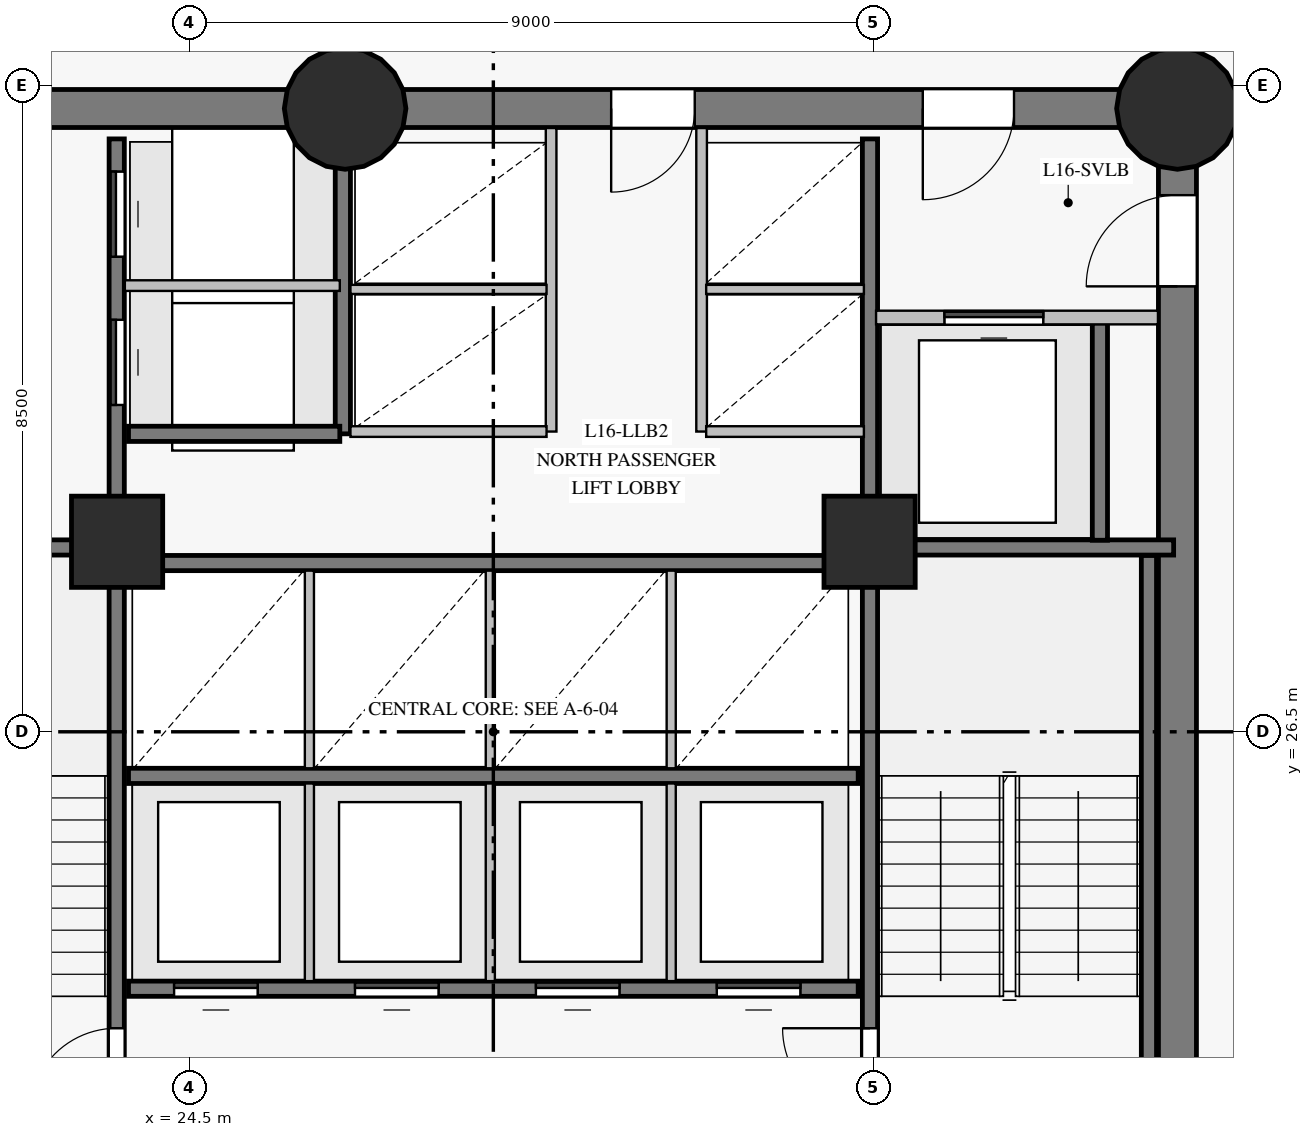
"""IFC4 building model, lengths in metres.
Left out: names, types, materials, properties, quantities, classifications, styles, units other than length and angle.
Written with IfcOpenShell. Run it as: python <this file> out.ifc"""

import sys

from ifc_helpers import new_model, si_unit, direction, frame, frame_2d, origin, origin_with_axes, origin_2d, place, context, subcontext, project, spatial, rectangle, circle, extrude, source, transform, mapped, element, fill, save


model = new_model("IFC4")
c1 = context("Model", 3, precision=1e-05, world=origin(), true_north=direction((0.0, 1.0)))
c2 = subcontext(c1, "Body", "Model", "MODEL_VIEW")
j1 = project(units=[si_unit("LENGTHUNIT", "METRE"), si_unit("PLANEANGLEUNIT", "RADIAN")], contexts=[c1])
p1 = place(None, origin())
s1 = spatial("IfcSite", under=j1, at=p1, CompositionType="ELEMENT")
p2 = place(p1, origin())
s2 = spatial("IfcBuilding", under=s1, at=p2, CompositionType="ELEMENT")
p3 = place(p2, frame((0.0, 0.0, 62.5)))
s3 = spatial("IfcBuildingStorey", under=s2, at=p3, CompositionType="ELEMENT", Elevation=62.5)
p4 = place(p3, frame((37.5, 18.3, 0.0), z_axis=(0.0, 0.0, 1.0), x_axis=(0.0, 1.0, 0.0)))
e1 = element("IfcWall", 1, at=p4, inside=s3, PredefinedType="SHEAR", context=c2, shape_type="SweptSolid", body=[
    extrude(rectangle(XDim=16.4, YDim=0.5, at=frame_2d((8.2, 0.0))), origin(), (0.0, 0.0, 1.0), 3.35),
])
p5 = place(p4, frame((14.06, 0.0, 0.0)))
e2 = element("IfcOpeningElement", 2, at=p5, cuts=e1, PredefinedType="OPENING", context=c2, shape_type="SweptSolid", body=[
    extrude(rectangle(XDim=1.2, YDim=2.15, at=frame_2d((0.6, 1.075))), frame((0.0, 0.26, 0.0), z_axis=(0.0, -1.0, 0.0), x_axis=(1.0, 0.0, 0.0)), (0.0, 0.0, 1.0), 0.52),
])
p6 = place(p3, frame((37.5, 34.7, 0.0), z_axis=(0.0, 0.0, 1.0), x_axis=(-1.0, 0.0, 0.0)))
e3 = element("IfcWall", 3, at=p6, inside=s3, PredefinedType="SHEAR", context=c2, shape_type="SweptSolid", body=[
    extrude(rectangle(XDim=10.95, YDim=0.5, at=frame_2d((5.475, 0.0))), origin(), (0.0, 0.0, 1.0), 3.35),
])
p7 = place(p6, frame((2.15, 0.0, 0.0)))
e4 = element("IfcOpeningElement", 4, at=p7, cuts=e3, PredefinedType="OPENING", context=c2, shape_type="SweptSolid", body=[
    extrude(rectangle(XDim=1.2, YDim=2.15, at=frame_2d((0.6, 1.075))), frame((0.0, 0.26, 0.0), z_axis=(0.0, -1.0, 0.0), x_axis=(1.0, 0.0, 0.0)), (0.0, 0.0, 1.0), 0.52),
])
p8 = place(p6, frame((6.35, 0.0, 0.0)))
e5 = element("IfcOpeningElement", 5, at=p8, cuts=e3, PredefinedType="OPENING", context=c2, shape_type="SweptSolid", body=[
    extrude(rectangle(XDim=1.1, YDim=2.15, at=frame_2d((0.55, 1.075))), frame((0.0, 0.26, 0.0), z_axis=(0.0, -1.0, 0.0), x_axis=(1.0, 0.0, 0.0)), (0.0, 0.0, 1.0), 0.52),
])
p9 = place(p3, frame((26.55, 34.7, 0.0), z_axis=(0.0, 0.0, 1.0), x_axis=(-1.0, 0.0, 0.0)))
e6 = element("IfcWall", 6, at=p9, inside=s3, PredefinedType="SHEAR", context=c2, shape_type="SweptSolid", body=[
    extrude(rectangle(XDim=7.05, YDim=0.5, at=frame_2d((3.525, 0.0))), origin(), (0.0, 0.0, 1.0), 3.35),
])
p10 = place(p9, frame((4.25, 0.0, 0.0)))
e7 = element("IfcOpeningElement", 7, at=p10, cuts=e6, PredefinedType="OPENING", context=c2, shape_type="SweptSolid", body=[
    extrude(rectangle(XDim=1.1, YDim=2.15, at=frame_2d((0.55, 1.075))), frame((0.0, 0.26, 0.0), z_axis=(0.0, -1.0, 0.0), x_axis=(1.0, 0.0, 0.0)), (0.0, 0.0, 1.0), 0.52),
])
m1 = source(origin_with_axes(), c2, "Body", "SweptSolid", [
    extrude(circle(Radius=0.8, at=origin_2d()), origin(), (0.0, 0.0, 1.0), 3.6),
])
for number, where, z_axis, x_axis in (
    (8, (26.55, 34.7, 0.0), (0.0, 0.0, 1.0), (1.0, 0.0, 0.0)),
    (9, (37.5, 34.7, 0.0), (0.0, 0.0, 1.0), (1.0, 0.0, 0.0)),
):
    element("IfcColumn", number, at=place(p3, frame(where, z_axis=z_axis, x_axis=x_axis)), inside=s3, PredefinedType="COLUMN", context=c2, shape_type="MappedRepresentation", body=[
        mapped(m1, transform((0.0, 0.0, 0.0), scale=1.0)),
    ])
m2 = source(origin_with_axes(), c2, "Body", "SweptSolid", [
    extrude(rectangle(XDim=1.2, YDim=1.2, at=origin_2d()), origin(), (0.0, 0.0, 1.0), 3.6),
])
for number, where, z_axis, x_axis in (
    (10, (23.55, 29.0, 0.0), (0.0, 0.0, 1.0), (1.0, 0.0, 0.0)),
    (11, (33.45, 29.0, 0.0), (0.0, 0.0, 1.0), (1.0, 0.0, 0.0)),
):
    element("IfcColumn", number, at=place(p3, frame(where, z_axis=z_axis, x_axis=x_axis)), inside=s3, PredefinedType="COLUMN", context=c2, shape_type="MappedRepresentation", body=[
        mapped(m2, transform((0.0, 0.0, 0.0), scale=1.0)),
    ])
p11 = place(p3, frame((23.545, 18.7, 0.0), z_axis=(0.0, 0.0, 1.0), x_axis=(0.0, 1.0, 0.0)))
e12 = element("IfcWall", 12, at=p11, inside=s3, PredefinedType="SHEAR", context=c2, shape_type="SweptSolid", body=[
    extrude(rectangle(XDim=15.6, YDim=0.2, at=frame_2d((7.8, 0.0))), origin(), (0.0, 0.0, 1.0), 3.35),
])
p12 = place(p11, frame((2.75, 0.0, 0.0)))
e13 = element("IfcOpeningElement", 13, at=p12, cuts=e12, PredefinedType="OPENING", context=c2, shape_type="SweptSolid", body=[
    extrude(rectangle(XDim=1.15, YDim=2.15, at=frame_2d((0.575, 1.075))), frame((0.0, 0.11, 0.0), z_axis=(0.0, -1.0, 0.0), x_axis=(1.0, 0.0, 0.0)), (0.0, 0.0, 1.0), 0.22),
])
p13 = place(p11, frame((0.14, 0.0, 0.0)))
e14 = element("IfcOpeningElement", 14, at=p13, cuts=e12, PredefinedType="OPENING", context=c2, shape_type="SweptSolid", body=[
    extrude(rectangle(XDim=0.88, YDim=2.1, at=frame_2d((0.44, 1.05))), frame((0.0, 0.11, 0.0), z_axis=(0.0, -1.0, 0.0), x_axis=(1.0, 0.0, 0.0)), (0.0, 0.0, 1.0), 0.22),
])
p14 = place(p11, frame((1.36, 0.0, 0.0)))
e15 = element("IfcOpeningElement", 15, at=p14, cuts=e12, PredefinedType="OPENING", context=c2, shape_type="SweptSolid", body=[
    extrude(rectangle(XDim=0.88, YDim=2.1, at=frame_2d((0.44, 1.05))), frame((0.0, 0.11, 0.0), z_axis=(0.0, -1.0, 0.0), x_axis=(1.0, 0.0, 0.0)), (0.0, 0.0, 1.0), 0.22),
])
p15 = place(p11, frame((12.1, 0.0, 0.0)))
e16 = element("IfcOpeningElement", 16, at=p15, cuts=e12, PredefinedType="OPENING", context=c2, shape_type="SweptSolid", body=[
    extrude(rectangle(XDim=1.12, YDim=2.15, at=frame_2d((0.56, 1.075))), frame((0.0, 0.11, 0.0), z_axis=(0.0, -1.0, 0.0), x_axis=(1.0, 0.0, 0.0)), (0.0, 0.0, 1.0), 0.22),
])
p16 = place(p11, frame((14.05, 0.0, 0.0)))
e17 = element("IfcOpeningElement", 17, at=p16, cuts=e12, PredefinedType="OPENING", context=c2, shape_type="SweptSolid", body=[
    extrude(rectangle(XDim=1.12, YDim=2.15, at=frame_2d((0.56, 1.075))), frame((0.0, 0.11, 0.0), z_axis=(0.0, -1.0, 0.0), x_axis=(1.0, 0.0, 0.0)), (0.0, 0.0, 1.0), 0.22),
])
p17 = place(p3, frame((33.455, 18.7, 0.0), z_axis=(0.0, 0.0, 1.0), x_axis=(0.0, 1.0, 0.0)))
e18 = element("IfcWall", 18, at=p17, inside=s3, PredefinedType="SHEAR", context=c2, shape_type="SweptSolid", body=[
    extrude(rectangle(XDim=15.6, YDim=0.2, at=frame_2d((7.8, 0.0))), origin(), (0.0, 0.0, 1.0), 3.35),
])
p18 = place(p17, frame((2.75, 0.0, 0.0)))
e19 = element("IfcOpeningElement", 19, at=p18, cuts=e18, PredefinedType="OPENING", context=c2, shape_type="SweptSolid", body=[
    extrude(rectangle(XDim=1.15, YDim=2.15, at=frame_2d((0.575, 1.075))), frame((0.0, 0.11, 0.0), z_axis=(0.0, -1.0, 0.0), x_axis=(1.0, 0.0, 0.0)), (0.0, 0.0, 1.0), 0.22),
])
p19 = place(p17, frame((0.55, 0.0, 0.0)))
e20 = element("IfcOpeningElement", 20, at=p19, cuts=e18, PredefinedType="OPENING", context=c2, shape_type="SweptSolid", body=[
    extrude(rectangle(XDim=0.94, YDim=2.1, at=frame_2d((0.47, 1.05))), frame((0.0, 0.11, 0.0), z_axis=(0.0, -1.0, 0.0), x_axis=(1.0, 0.0, 0.0)), (0.0, 0.0, 1.0), 0.22),
])
p20 = place(p3, frame((23.7, 23.12, 0.0), z_axis=(0.0, 0.0, 1.0), x_axis=(1.0, 0.0, 0.0)))
e21 = element("IfcWall", 21, at=p20, inside=s3, PredefinedType="SHEAR", context=c2, shape_type="SweptSolid", body=[
    extrude(rectangle(XDim=9.6, YDim=0.2, at=frame_2d((4.8, 0.0))), origin(), (0.0, 0.0, 1.0), 3.35),
])
p21 = place(p20, frame((0.6, 0.0, 0.0)))
e22 = element("IfcOpeningElement", 22, at=p21, cuts=e21, PredefinedType="OPENING", context=c2, shape_type="SweptSolid", body=[
    extrude(rectangle(XDim=1.1, YDim=2.15, at=frame_2d((0.55, 1.075))), frame((0.0, 0.11, 0.0), z_axis=(0.0, -1.0, 0.0), x_axis=(1.0, 0.0, 0.0)), (0.0, 0.0, 1.0), 0.22),
])
p22 = place(p20, frame((2.98, 0.0, 0.0)))
e23 = element("IfcOpeningElement", 23, at=p22, cuts=e21, PredefinedType="OPENING", context=c2, shape_type="SweptSolid", body=[
    extrude(rectangle(XDim=1.1, YDim=2.15, at=frame_2d((0.55, 1.075))), frame((0.0, 0.11, 0.0), z_axis=(0.0, -1.0, 0.0), x_axis=(1.0, 0.0, 0.0)), (0.0, 0.0, 1.0), 0.22),
])
p23 = place(p20, frame((5.36, 0.0, 0.0)))
e24 = element("IfcOpeningElement", 24, at=p23, cuts=e21, PredefinedType="OPENING", context=c2, shape_type="SweptSolid", body=[
    extrude(rectangle(XDim=1.1, YDim=2.15, at=frame_2d((0.55, 1.075))), frame((0.0, 0.11, 0.0), z_axis=(0.0, -1.0, 0.0), x_axis=(1.0, 0.0, 0.0)), (0.0, 0.0, 1.0), 0.22),
])
p24 = place(p20, frame((7.74, 0.0, 0.0)))
e25 = element("IfcOpeningElement", 25, at=p24, cuts=e21, PredefinedType="OPENING", context=c2, shape_type="SweptSolid", body=[
    extrude(rectangle(XDim=1.1, YDim=2.15, at=frame_2d((0.55, 1.075))), frame((0.0, 0.11, 0.0), z_axis=(0.0, -1.0, 0.0), x_axis=(1.0, 0.0, 0.0)), (0.0, 0.0, 1.0), 0.22),
])
for number, where, z_axis, x_axis in (
    (26, (23.7, 25.92, 0.0), (0.0, 0.0, 1.0), (1.0, 0.0, 0.0)),
    (27, (23.7, 28.72, 0.0), (0.0, 0.0, 1.0), (1.0, 0.0, 0.0)),
):
    element("IfcWall", number, at=place(p3, frame(where, z_axis=z_axis, x_axis=x_axis)), inside=s3, PredefinedType="SHEAR", context=c2, shape_type="SweptSolid", body=[
        extrude(rectangle(XDim=9.6, YDim=0.2, at=frame_2d((4.8, 0.0))), origin(), (0.0, 0.0, 1.0), 3.35),
    ])
p25 = place(p3, frame((37.125, 21.32, 0.0), z_axis=(0.0, 0.0, 1.0), x_axis=(0.0, 1.0, 0.0)))
e28 = element("IfcWall", 28, at=p25, inside=s3, PredefinedType="SHEAR", context=c2, shape_type="SweptSolid", body=[
    extrude(rectangle(XDim=7.5, YDim=0.2, at=frame_2d((3.75, 0.0))), origin(), (0.0, 0.0, 1.0), 3.35),
])
for number, where, z_axis, x_axis in (
    (29, (33.455, 28.925, 0.0), (0.0, 0.0, 1.0), (1.0, 0.0, 0.0)),
    (30, (19.55, 28.925, 0.0), (0.0, 0.0, 1.0), (1.0, 0.0, 0.0)),
):
    element("IfcWall", number, at=place(p3, frame(where, z_axis=z_axis, x_axis=x_axis)), inside=s3, PredefinedType="SHEAR", context=c2, shape_type="SweptSolid", body=[
        extrude(rectangle(XDim=3.995, YDim=0.2, at=frame_2d((1.998, 0.0))), origin(), (0.0, 0.0, 1.0), 3.35),
    ])
p26 = place(p3, frame((26.52, 30.42, 0.0), z_axis=(0.0, 0.0, 1.0), x_axis=(0.0, 1.0, 0.0)))
e31 = element("IfcWall", 31, at=p26, inside=s3, PredefinedType="SHEAR", context=c2, shape_type="SweptSolid", body=[
    extrude(rectangle(XDim=3.86, YDim=0.2, at=frame_2d((1.93, 0.0))), origin(), (0.0, 0.0, 1.0), 3.35),
])
p27 = place(p3, frame((36.48, 29.02, 0.0), z_axis=(0.0, 0.0, 1.0), x_axis=(0.0, 1.0, 0.0)))
e32 = element("IfcWall", 32, at=p27, inside=s3, PredefinedType="SHEAR", context=c2, shape_type="SweptSolid", body=[
    extrude(rectangle(XDim=2.86, YDim=0.2, at=frame_2d((1.43, 0.0))), origin(), (0.0, 0.0, 1.0), 3.35),
])
p28 = place(p3, frame((23.7, 30.42, 0.0), z_axis=(0.0, 0.0, 1.0), x_axis=(1.0, 0.0, 0.0)))
e33 = element("IfcWall", 33, at=p28, inside=s3, PredefinedType="SHEAR", context=c2, shape_type="SweptSolid", body=[
    extrude(rectangle(XDim=2.78, YDim=0.2, at=frame_2d((1.39, 0.0))), origin(), (0.0, 0.0, 1.0), 3.35),
])
for number, where, z_axis, x_axis in (
    (34, (29.26, 30.45, 0.0), (0.0, 0.0, 1.0), (0.0, 1.0, 0.0)),
    (35, (31.24, 30.45, 0.0), (0.0, 0.0, 1.0), (0.0, 1.0, 0.0)),
):
    element("IfcWall", number, at=place(p3, frame(where, z_axis=z_axis, x_axis=x_axis)), inside=s3, PredefinedType="PARTITIONING", context=c2, shape_type="SweptSolid", body=[
        extrude(rectangle(XDim=3.993, YDim=0.14, at=frame_2d((1.997, 0.0))), origin(), (0.0, 0.0, 1.0), 3.35),
    ])
p29 = place(p3, frame((33.535, 31.95, 0.0), z_axis=(0.0, 0.0, 1.0), x_axis=(1.0, 0.0, 0.0)))
e36 = element("IfcWall", 36, at=p29, inside=s3, PredefinedType="PARTITIONING", context=c2, shape_type="SweptSolid", body=[
    extrude(rectangle(XDim=3.709, YDim=0.18, at=frame_2d((1.854, 0.0))), origin(), (0.0, 0.0, 1.0), 3.35),
])
p30 = place(p29, frame((0.9, 0.0, 0.0)))
e37 = element("IfcOpeningElement", 37, at=p30, cuts=e36, PredefinedType="OPENING", context=c2, shape_type="SweptSolid", body=[
    extrude(rectangle(XDim=1.3, YDim=2.2, at=frame_2d((0.65, 1.1))), frame((0.0, 0.1, 0.0), z_axis=(0.0, -1.0, 0.0), x_axis=(1.0, 0.0, 0.0)), (0.0, 0.0, 1.0), 0.2),
])
p31 = place(p3, frame((23.652, 32.37, 0.0), z_axis=(0.0, 0.0, 1.0), x_axis=(1.0, 0.0, 0.0)))
e38 = element("IfcWall", 38, at=p31, inside=s3, PredefinedType="PARTITIONING", context=c2, shape_type="SweptSolid", body=[
    extrude(rectangle(XDim=2.828, YDim=0.14, at=frame_2d((1.414, 0.0))), origin(), (0.0, 0.0, 1.0), 3.35),
])
for number, where, z_axis, x_axis in (
    (39, (26.08, 23.22, 0.0), (0.0, 0.0, 1.0), (0.0, 1.0, 0.0)),
    (40, (28.46, 23.22, 0.0), (0.0, 0.0, 1.0), (0.0, 1.0, 0.0)),
    (41, (30.84, 23.22, 0.0), (0.0, 0.0, 1.0), (0.0, 1.0, 0.0)),
    (42, (26.08, 26.02, 0.0), (0.0, 0.0, 1.0), (0.0, 1.0, 0.0)),
    (43, (28.46, 26.02, 0.0), (0.0, 0.0, 1.0), (0.0, 1.0, 0.0)),
    (44, (30.84, 26.02, 0.0), (0.0, 0.0, 1.0), (0.0, 1.0, 0.0)),
):
    element("IfcWall", number, at=place(p3, frame(where, z_axis=z_axis, x_axis=x_axis)), inside=s3, PredefinedType="PARTITIONING", context=c2, shape_type="SweptSolid", body=[
        extrude(rectangle(XDim=2.6, YDim=0.12, at=frame_2d((1.3, 0.0))), origin(), (0.0, 0.0, 1.0), 3.35),
    ])
p32 = place(p3, frame((26.62, 30.45, 0.0), z_axis=(0.0, 0.0, 1.0), x_axis=(1.0, 0.0, 0.0)))
e45 = element("IfcWall", 45, at=p32, inside=s3, PredefinedType="PARTITIONING", context=c2, shape_type="SweptSolid", body=[
    extrude(rectangle(XDim=2.58, YDim=0.14, at=frame_2d((1.29, 0.0))), origin(), (0.0, 0.0, 1.0), 3.35),
])
p33 = place(p3, frame((26.62, 32.32, 0.0), z_axis=(0.0, 0.0, 1.0), x_axis=(1.0, 0.0, 0.0)))
e46 = element("IfcWall", 46, at=p33, inside=s3, PredefinedType="PARTITIONING", context=c2, shape_type="SweptSolid", body=[
    extrude(rectangle(XDim=2.58, YDim=0.12, at=frame_2d((1.29, 0.0))), origin(), (0.0, 0.0, 1.0), 3.35),
])
p34 = place(p3, frame((31.3, 30.45, 0.0), z_axis=(0.0, 0.0, 1.0), x_axis=(1.0, 0.0, 0.0)))
e47 = element("IfcWall", 47, at=p34, inside=s3, PredefinedType="PARTITIONING", context=c2, shape_type="SweptSolid", body=[
    extrude(rectangle(XDim=2.075, YDim=0.14, at=frame_2d((1.038, 0.0))), origin(), (0.0, 0.0, 1.0), 3.35),
])
p35 = place(p3, frame((31.3, 32.32, 0.0), z_axis=(0.0, 0.0, 1.0), x_axis=(1.0, 0.0, 0.0)))
e48 = element("IfcWall", 48, at=p35, inside=s3, PredefinedType="PARTITIONING", context=c2, shape_type="SweptSolid", body=[
    extrude(rectangle(XDim=2.075, YDim=0.12, at=frame_2d((1.038, 0.0))), origin(), (0.0, 0.0, 1.0), 3.35),
])
m3 = source(origin_with_axes(), c2, "Body", "SweptSolid", [
    extrude(rectangle(XDim=1.15, YDim=2.15, at=frame_2d((0.575, 1.075))), frame((0.0, 0.025, 0.0), z_axis=(0.0, -1.0, 0.0), x_axis=(1.0, 0.0, 0.0)), (0.0, 0.0, 1.0), 0.05),
])
p36 = place(p12, origin())
e49 = element("IfcDoor", 49, at=p36, inside=s3, OperationType="SINGLE_SWING_LEFT", PredefinedType="DOOR", context=c2, shape_type="MappedRepresentation", body=[
    mapped(m3, transform((0.0, 0.0, 0.0), scale=1.0)),
])
fill(e13, e49)
p37 = place(p18, origin())
e50 = element("IfcDoor", 50, at=p37, inside=s3, OperationType="SINGLE_SWING_RIGHT", PredefinedType="DOOR", context=c2, shape_type="MappedRepresentation", body=[
    mapped(m3, transform((0.0, 0.0, 0.0), scale=1.0)),
])
fill(e19, e50)
m4 = source(origin_with_axes(), c2, "Body", "SweptSolid", [
    extrude(rectangle(XDim=1.2, YDim=2.15, at=frame_2d((0.6, 1.075))), frame((0.0, 0.025, 0.0), z_axis=(0.0, -1.0, 0.0), x_axis=(1.0, 0.0, 0.0)), (0.0, 0.0, 1.0), 0.05),
])
p38 = place(p5, origin())
e51 = element("IfcDoor", 51, at=p38, inside=s3, OperationType="SINGLE_SWING_LEFT", PredefinedType="DOOR", context=c2, shape_type="MappedRepresentation", body=[
    mapped(m4, transform((0.0, 0.0, 0.0), scale=1.0)),
])
fill(e2, e51)
p39 = place(p7, origin())
e52 = element("IfcDoor", 52, at=p39, inside=s3, OperationType="SINGLE_SWING_RIGHT", PredefinedType="DOOR", context=c2, shape_type="MappedRepresentation", body=[
    mapped(m4, transform((0.0, 0.0, 0.0), scale=1.0)),
])
fill(e4, e52)
m5 = source(origin_with_axes(), c2, "Body", "SweptSolid", [
    extrude(rectangle(XDim=1.3, YDim=2.2, at=frame_2d((0.65, 1.1))), frame((0.0, 0.025, 0.0), z_axis=(0.0, -1.0, 0.0), x_axis=(1.0, 0.0, 0.0)), (0.0, 0.0, 1.0), 0.05),
])
p40 = place(p30, origin())
e53 = element("IfcDoor", 53, at=p40, inside=s3, OperationType="SLIDING_TO_LEFT", PredefinedType="DOOR", context=c2, shape_type="MappedRepresentation", body=[
    mapped(m5, transform((0.0, 0.0, 0.0), scale=1.0)),
])
fill(e37, e53)
m6 = source(origin_with_axes(), c2, "Body", "SweptSolid", [
    extrude(rectangle(XDim=1.1, YDim=2.15, at=frame_2d((0.55, 1.075))), frame((0.0, 0.025, 0.0), z_axis=(0.0, -1.0, 0.0), x_axis=(1.0, 0.0, 0.0)), (0.0, 0.0, 1.0), 0.05),
])
p41 = place(p21, origin())
e54 = element("IfcDoor", 54, at=p41, inside=s3, OperationType="SLIDING_TO_LEFT", PredefinedType="DOOR", context=c2, shape_type="MappedRepresentation", body=[
    mapped(m6, transform((0.0, 0.0, 0.0), scale=1.0)),
])
fill(e22, e54)
p42 = place(p22, origin())
e55 = element("IfcDoor", 55, at=p42, inside=s3, OperationType="SLIDING_TO_RIGHT", PredefinedType="DOOR", context=c2, shape_type="MappedRepresentation", body=[
    mapped(m6, transform((0.0, 0.0, 0.0), scale=1.0)),
])
fill(e23, e55)
p43 = place(p23, origin())
e56 = element("IfcDoor", 56, at=p43, inside=s3, OperationType="SLIDING_TO_LEFT", PredefinedType="DOOR", context=c2, shape_type="MappedRepresentation", body=[
    mapped(m6, transform((0.0, 0.0, 0.0), scale=1.0)),
])
fill(e24, e56)
p44 = place(p24, origin())
e57 = element("IfcDoor", 57, at=p44, inside=s3, OperationType="SLIDING_TO_RIGHT", PredefinedType="DOOR", context=c2, shape_type="MappedRepresentation", body=[
    mapped(m6, transform((0.0, 0.0, 0.0), scale=1.0)),
])
fill(e25, e57)
p45 = place(p8, origin())
e58 = element("IfcDoor", 58, at=p45, inside=s3, OperationType="SINGLE_SWING_RIGHT", PredefinedType="DOOR", context=c2, shape_type="MappedRepresentation", body=[
    mapped(m6, transform((0.0, 0.0, 0.0), scale=1.0)),
])
fill(e5, e58)
m7 = source(origin_with_axes(), c2, "Body", "SweptSolid", [
    extrude(rectangle(XDim=1.12, YDim=2.15, at=frame_2d((0.56, 1.075))), frame((0.0, 0.025, 0.0), z_axis=(0.0, -1.0, 0.0), x_axis=(1.0, 0.0, 0.0)), (0.0, 0.0, 1.0), 0.05),
])
p46 = place(p15, origin())
e59 = element("IfcDoor", 59, at=p46, inside=s3, OperationType="SLIDING_TO_LEFT", PredefinedType="DOOR", context=c2, shape_type="MappedRepresentation", body=[
    mapped(m7, transform((0.0, 0.0, 0.0), scale=1.0)),
])
fill(e16, e59)
p47 = place(p16, origin())
e60 = element("IfcDoor", 60, at=p47, inside=s3, OperationType="SLIDING_TO_RIGHT", PredefinedType="DOOR", context=c2, shape_type="MappedRepresentation", body=[
    mapped(m7, transform((0.0, 0.0, 0.0), scale=1.0)),
])
fill(e17, e60)
save(model, sys.argv[1])
